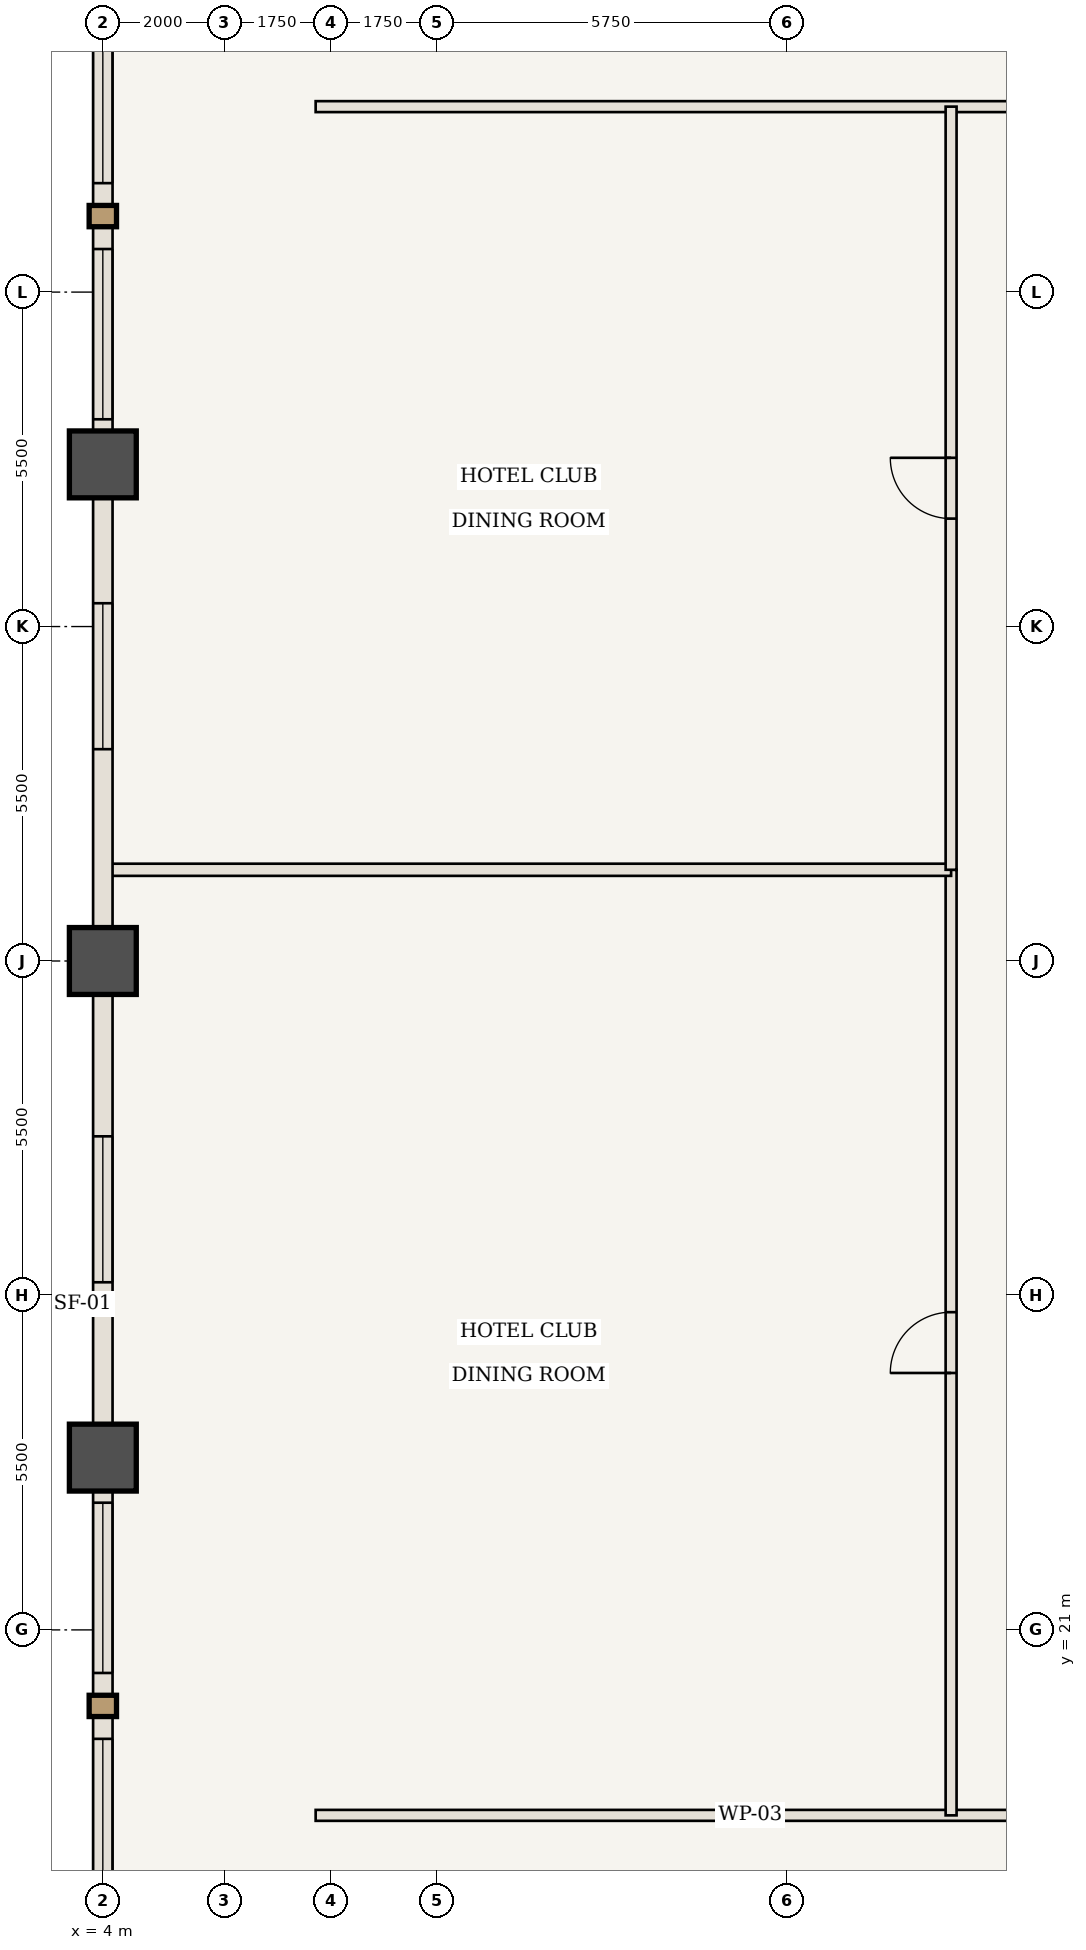
"""IFC4 building model, lengths in metres.
Left out: names, types, materials, properties, quantities, classifications, styles, units other than length and angle.
Written with IfcOpenShell. Run it as: python <this file> out.ifc"""

import sys

from ifc_helpers import new_model, si_unit, direction, frame, frame_2d, origin, origin_2d, place, context, subcontext, project, spatial, rectangle, extrude, element, fill, save


model = new_model("IFC4")
c1 = context("Model", 3, precision=1e-05, world=origin(), true_north=direction((0.0, 1.0)))
c2 = subcontext(c1, "Body", "Model", "MODEL_VIEW")
j1 = project(units=[si_unit("LENGTHUNIT", "METRE"), si_unit("PLANEANGLEUNIT", "RADIAN")], contexts=[c1])
p1 = place(None, origin())
s1 = spatial("IfcSite", under=j1, at=p1, CompositionType="ELEMENT")
p2 = place(p1, origin())
s2 = spatial("IfcBuilding", under=s1, at=p2, CompositionType="ELEMENT")
p3 = place(p2, frame((0.0, 0.0, 70.35)))
s3 = spatial("IfcBuildingStorey", under=s2, at=p3, CompositionType="ELEMENT", Elevation=70.35)
for number, where, z_axis, x_axis in (
    (1, (4.0, 23.833, 0.0), (0.0, 0.0, 1.0), (1.0, 0.0, 0.0)),
    (2, (4.0, 32.0, 0.0), (0.0, 0.0, 1.0), (1.0, 0.0, 0.0)),
    (3, (4.0, 40.167, 0.0), (0.0, 0.0, 1.0), (1.0, 0.0, 0.0)),
):
    element("IfcColumn", number, at=place(p3, frame(where, z_axis=z_axis, x_axis=x_axis)), inside=s3, PredefinedType="COLUMN", context=c2, shape_type="SweptSolid", body=[
        extrude(rectangle(XDim=1.1, YDim=1.1, at=origin_2d()), origin(), (0.0, 0.0, 1.0), 3.5),
    ])
p4 = place(p3, frame((7.5, 17.95, 0.0), z_axis=(0.0, 0.0, 1.0), x_axis=(1.0, 0.0, 0.0)))
e4 = element("IfcWall", 4, at=p4, inside=s3, PredefinedType="STANDARD", context=c2, shape_type="SweptSolid", body=[
    extrude(rectangle(XDim=14.3, YDim=0.18, at=frame_2d((7.15, 0.0))), origin(), (0.0, 0.0, 1.0), 3.32),
])
p5 = place(p4, frame((11.9, 0.0, 0.0)))
e5 = element("IfcOpeningElement", 5, at=p5, cuts=e4, PredefinedType="OPENING", context=c2, shape_type="SweptSolid", body=[
    extrude(rectangle(XDim=1.0, YDim=2.15, at=frame_2d((0.5, 1.075))), frame((0.0, 0.1, 0.0), z_axis=(0.0, -1.0, 0.0), x_axis=(1.0, 0.0, 0.0)), (0.0, 0.0, 1.0), 0.2),
])
p6 = place(p3, frame((7.5, 46.05, 0.0), z_axis=(0.0, 0.0, 1.0), x_axis=(1.0, 0.0, 0.0)))
e6 = element("IfcWall", 6, at=p6, inside=s3, PredefinedType="STANDARD", context=c2, shape_type="SweptSolid", body=[
    extrude(rectangle(XDim=16.7, YDim=0.18, at=frame_2d((8.35, 0.0))), origin(), (0.0, 0.0, 1.0), 3.32),
])
p7 = place(p6, frame((11.65, 0.0, 0.0)))
e7 = element("IfcOpeningElement", 7, at=p7, cuts=e6, PredefinedType="OPENING", context=c2, shape_type="SweptSolid", body=[
    extrude(rectangle(XDim=1.0, YDim=2.15, at=frame_2d((0.5, 1.075))), frame((0.0, 0.1, 0.0), z_axis=(0.0, -1.0, 0.0), x_axis=(1.0, 0.0, 0.0)), (0.0, 0.0, 1.0), 0.2),
])
p8 = place(p3, frame((17.95, 17.95, 0.0), z_axis=(0.0, 0.0, 1.0), x_axis=(0.0, 1.0, 0.0)))
e8 = element("IfcWall", 8, at=p8, inside=s3, PredefinedType="STANDARD", context=c2, shape_type="SweptSolid", body=[
    extrude(rectangle(XDim=15.55, YDim=0.18, at=frame_2d((7.775, 0.0))), origin(), (0.0, 0.0, 1.0), 3.32),
])
p9 = place(p8, frame((7.275, 0.0, 0.0)))
e9 = element("IfcOpeningElement", 9, at=p9, cuts=e8, PredefinedType="OPENING", context=c2, shape_type="SweptSolid", body=[
    extrude(rectangle(XDim=1.0, YDim=2.15, at=frame_2d((0.5, 1.075))), frame((0.0, 0.1, 0.0), z_axis=(0.0, -1.0, 0.0), x_axis=(1.0, 0.0, 0.0)), (0.0, 0.0, 1.0), 0.2),
])
p10 = place(p3, frame((4.06, 33.5, 0.0), z_axis=(0.0, 0.0, 1.0), x_axis=(1.0, 0.0, 0.0)))
e10 = element("IfcWall", 10, at=p10, inside=s3, PredefinedType="STANDARD", context=c2, shape_type="SweptSolid", body=[
    extrude(rectangle(XDim=13.89, YDim=0.2, at=frame_2d((6.945, 0.0))), origin(), (0.0, 0.0, 1.0), 3.32),
])
p11 = place(p3, frame((17.95, 33.5, 0.0), z_axis=(0.0, 0.0, 1.0), x_axis=(0.0, 1.0, 0.0)))
e11 = element("IfcWall", 11, at=p11, inside=s3, PredefinedType="STANDARD", context=c2, shape_type="SweptSolid", body=[
    extrude(rectangle(XDim=12.55, YDim=0.18, at=frame_2d((6.275, 0.0))), origin(), (0.0, 0.0, 1.0), 3.32),
])
p12 = place(p11, frame((5.775, 0.0, 0.0)))
e12 = element("IfcOpeningElement", 12, at=p12, cuts=e11, PredefinedType="OPENING", context=c2, shape_type="SweptSolid", body=[
    extrude(rectangle(XDim=1.0, YDim=2.15, at=frame_2d((0.5, 1.075))), frame((0.0, 0.1, 0.0), z_axis=(0.0, -1.0, 0.0), x_axis=(1.0, 0.0, 0.0)), (0.0, 0.0, 1.0), 0.2),
])
p13 = place(p3, frame((4.0, 15.667, 0.0), z_axis=(0.0, 0.0, 1.0), x_axis=(0.0, 1.0, 0.0)))
e13 = element("IfcWall", 13, at=p13, inside=s3, PredefinedType="USERDEFINED", context=c2, shape_type="SweptSolid", body=[
    extrude(rectangle(XDim=8.167, YDim=0.32, at=frame_2d((4.083, 0.0))), origin(), (0.0, 0.0, 1.0), 2.52),
])
p14 = place(p13, frame((0.742, 0.0, 0.85)))
e14 = element("IfcOpeningElement", 14, at=p14, cuts=e13, PredefinedType="OPENING", context=c2, shape_type="SweptSolid", body=[
    extrude(rectangle(XDim=2.8, YDim=1.47, at=frame_2d((1.4, 0.735))), frame((0.0, 0.17, 0.0), z_axis=(0.0, -1.0, 0.0), x_axis=(1.0, 0.0, 0.0)), (0.0, 0.0, 1.0), 0.34),
])
p15 = place(p13, frame((4.625, 0.0, 0.85)))
e15 = element("IfcOpeningElement", 15, at=p15, cuts=e13, PredefinedType="OPENING", context=c2, shape_type="SweptSolid", body=[
    extrude(rectangle(XDim=2.8, YDim=1.47, at=frame_2d((1.4, 0.735))), frame((0.0, 0.17, 0.0), z_axis=(0.0, -1.0, 0.0), x_axis=(1.0, 0.0, 0.0)), (0.0, 0.0, 1.0), 0.34),
])
p16 = place(p3, frame((4.0, 23.833, 0.0), z_axis=(0.0, 0.0, 1.0), x_axis=(0.0, 1.0, 0.0)))
e16 = element("IfcWall", 16, at=p16, inside=s3, PredefinedType="USERDEFINED", context=c2, shape_type="SweptSolid", body=[
    extrude(rectangle(XDim=8.167, YDim=0.32, at=frame_2d((4.083, 0.0))), origin(), (0.0, 0.0, 1.0), 2.52),
])
p17 = place(p16, frame((2.883, 0.0, 0.85)))
e17 = element("IfcOpeningElement", 17, at=p17, cuts=e16, PredefinedType="OPENING", context=c2, shape_type="SweptSolid", body=[
    extrude(rectangle(XDim=2.4, YDim=1.47, at=frame_2d((1.2, 0.735))), frame((0.0, 0.17, 0.0), z_axis=(0.0, -1.0, 0.0), x_axis=(1.0, 0.0, 0.0)), (0.0, 0.0, 1.0), 0.34),
])
p18 = place(p3, frame((4.0, 32.0, 0.0), z_axis=(0.0, 0.0, 1.0), x_axis=(0.0, 1.0, 0.0)))
e18 = element("IfcWall", 18, at=p18, inside=s3, PredefinedType="USERDEFINED", context=c2, shape_type="SweptSolid", body=[
    extrude(rectangle(XDim=8.167, YDim=0.32, at=frame_2d((4.083, 0.0))), origin(), (0.0, 0.0, 1.0), 2.52),
])
p19 = place(p18, frame((3.483, 0.0, 0.85)))
e19 = element("IfcOpeningElement", 19, at=p19, cuts=e18, PredefinedType="OPENING", context=c2, shape_type="SweptSolid", body=[
    extrude(rectangle(XDim=2.4, YDim=1.47, at=frame_2d((1.2, 0.735))), frame((0.0, 0.17, 0.0), z_axis=(0.0, -1.0, 0.0), x_axis=(1.0, 0.0, 0.0)), (0.0, 0.0, 1.0), 0.34),
])
p20 = place(p3, frame((4.0, 40.167, 0.0), z_axis=(0.0, 0.0, 1.0), x_axis=(0.0, 1.0, 0.0)))
e20 = element("IfcWall", 20, at=p20, inside=s3, PredefinedType="USERDEFINED", context=c2, shape_type="SweptSolid", body=[
    extrude(rectangle(XDim=8.167, YDim=0.32, at=frame_2d((4.083, 0.0))), origin(), (0.0, 0.0, 1.0), 2.52),
])
p21 = place(p20, frame((0.742, 0.0, 0.85)))
e21 = element("IfcOpeningElement", 21, at=p21, cuts=e20, PredefinedType="OPENING", context=c2, shape_type="SweptSolid", body=[
    extrude(rectangle(XDim=2.8, YDim=1.47, at=frame_2d((1.4, 0.735))), frame((0.0, 0.17, 0.0), z_axis=(0.0, -1.0, 0.0), x_axis=(1.0, 0.0, 0.0)), (0.0, 0.0, 1.0), 0.34),
])
p22 = place(p20, frame((4.625, 0.0, 0.85)))
e22 = element("IfcOpeningElement", 22, at=p22, cuts=e20, PredefinedType="OPENING", context=c2, shape_type="SweptSolid", body=[
    extrude(rectangle(XDim=2.8, YDim=1.47, at=frame_2d((1.4, 0.735))), frame((0.0, 0.17, 0.0), z_axis=(0.0, -1.0, 0.0), x_axis=(1.0, 0.0, 0.0)), (0.0, 0.0, 1.0), 0.34),
])
p23 = place(p9, origin())
e23 = element("IfcDoor", 23, at=p23, inside=s3, OperationType="SINGLE_SWING_LEFT", PredefinedType="DOOR", context=c2, shape_type="SweptSolid", body=[
    extrude(rectangle(XDim=1.0, YDim=2.15, at=frame_2d((0.5, 1.075))), frame((0.0, 0.025, 0.0), z_axis=(0.0, -1.0, 0.0), x_axis=(1.0, 0.0, 0.0)), (0.0, 0.0, 1.0), 0.05),
])
fill(e9, e23)
p24 = place(p12, origin())
e24 = element("IfcDoor", 24, at=p24, inside=s3, OperationType="SINGLE_SWING_RIGHT", PredefinedType="DOOR", context=c2, shape_type="SweptSolid", body=[
    extrude(rectangle(XDim=1.0, YDim=2.15, at=frame_2d((0.5, 1.075))), frame((0.0, 0.025, 0.0), z_axis=(0.0, -1.0, 0.0), x_axis=(1.0, 0.0, 0.0)), (0.0, 0.0, 1.0), 0.05),
])
fill(e12, e24)
p25 = place(p14, origin())
e25 = element("IfcWindow", 25, at=p25, inside=s3, PartitioningType="SINGLE_PANEL", PredefinedType="WINDOW", context=c2, shape_type="SweptSolid", body=[
    extrude(rectangle(XDim=2.8, YDim=1.47, at=frame_2d((1.4, 0.735))), frame((0.0, 0.03, 0.0), z_axis=(0.0, -1.0, 0.0), x_axis=(1.0, 0.0, 0.0)), (0.0, 0.0, 1.0), 0.06),
])
fill(e14, e25)
p26 = place(p15, origin())
e26 = element("IfcWindow", 26, at=p26, inside=s3, PartitioningType="SINGLE_PANEL", PredefinedType="WINDOW", context=c2, shape_type="SweptSolid", body=[
    extrude(rectangle(XDim=2.8, YDim=1.47, at=frame_2d((1.4, 0.735))), frame((0.0, 0.03, 0.0), z_axis=(0.0, -1.0, 0.0), x_axis=(1.0, 0.0, 0.0)), (0.0, 0.0, 1.0), 0.06),
])
fill(e15, e26)
p27 = place(p17, origin())
e27 = element("IfcWindow", 27, at=p27, inside=s3, PartitioningType="SINGLE_PANEL", PredefinedType="WINDOW", context=c2, shape_type="SweptSolid", body=[
    extrude(rectangle(XDim=2.4, YDim=1.47, at=frame_2d((1.2, 0.735))), frame((0.0, 0.03, 0.0), z_axis=(0.0, -1.0, 0.0), x_axis=(1.0, 0.0, 0.0)), (0.0, 0.0, 1.0), 0.06),
])
fill(e17, e27)
p28 = place(p19, origin())
e28 = element("IfcWindow", 28, at=p28, inside=s3, PartitioningType="SINGLE_PANEL", PredefinedType="WINDOW", context=c2, shape_type="SweptSolid", body=[
    extrude(rectangle(XDim=2.4, YDim=1.47, at=frame_2d((1.2, 0.735))), frame((0.0, 0.03, 0.0), z_axis=(0.0, -1.0, 0.0), x_axis=(1.0, 0.0, 0.0)), (0.0, 0.0, 1.0), 0.06),
])
fill(e19, e28)
p29 = place(p21, origin())
e29 = element("IfcWindow", 29, at=p29, inside=s3, PartitioningType="SINGLE_PANEL", PredefinedType="WINDOW", context=c2, shape_type="SweptSolid", body=[
    extrude(rectangle(XDim=2.8, YDim=1.47, at=frame_2d((1.4, 0.735))), frame((0.0, 0.03, 0.0), z_axis=(0.0, -1.0, 0.0), x_axis=(1.0, 0.0, 0.0)), (0.0, 0.0, 1.0), 0.06),
])
fill(e21, e29)
p30 = place(p22, origin())
e30 = element("IfcWindow", 30, at=p30, inside=s3, PartitioningType="SINGLE_PANEL", PredefinedType="WINDOW", context=c2, shape_type="SweptSolid", body=[
    extrude(rectangle(XDim=2.8, YDim=1.47, at=frame_2d((1.4, 0.735))), frame((0.0, 0.03, 0.0), z_axis=(0.0, -1.0, 0.0), x_axis=(1.0, 0.0, 0.0)), (0.0, 0.0, 1.0), 0.06),
])
fill(e22, e30)
save(model, sys.argv[1])
